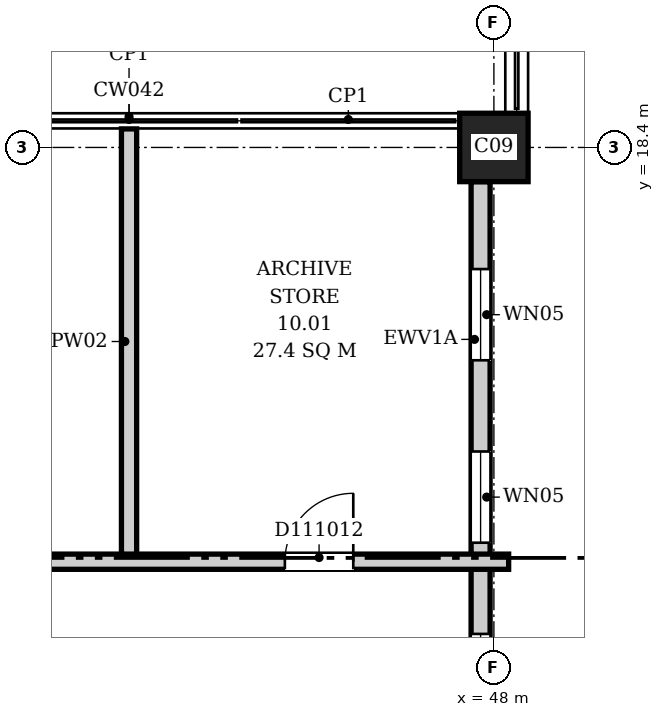
"""IFC4 building model, lengths in metres.
Left out: names, types, materials, properties, quantities, classifications, styles, units other than length and angle.
Written with IfcOpenShell. Run it as: python <this file> out.ifc"""

import sys

from ifc_helpers import new_model, si_unit, direction, frame, frame_2d, origin, origin_2d, place, context, subcontext, project, spatial, rectangle, extrude, element, fill, save


model = new_model("IFC4")
c1 = context("Model", 3, precision=1e-05, world=origin(), true_north=direction((0.0, 1.0)))
c2 = subcontext(c1, "Body", "Model", "MODEL_VIEW")
j1 = project(units=[si_unit("LENGTHUNIT", "METRE"), si_unit("PLANEANGLEUNIT", "RADIAN")], contexts=[c1])
p1 = place(None, origin())
s1 = spatial("IfcSite", under=j1, at=p1, CompositionType="ELEMENT")
p2 = place(p1, origin())
s2 = spatial("IfcBuilding", under=s1, at=p2, CompositionType="ELEMENT")
p3 = place(p2, frame((0.0, 0.0, 52.9)))
s3 = spatial("IfcBuildingStorey", under=s2, at=p3, CompositionType="ELEMENT", Elevation=52.9)
p4 = place(p3, frame((48.0, 18.4, 0.0), z_axis=(0.0, 0.0, 1.0), x_axis=(1.0, 0.0, 0.0)))
e1 = element("IfcColumn", 1, at=p4, inside=s3, PredefinedType="COLUMN", context=c2, shape_type="SweptSolid", body=[
    extrude(rectangle(XDim=0.9, YDim=0.9, at=origin_2d()), origin(), (0.0, 0.0, 1.0), 4.2),
])
p5 = place(p3, frame((47.825, 9.65, 0.0), z_axis=(0.0, 0.0, 1.0), x_axis=(0.0, 1.0, 0.0)))
e2 = element("IfcWall", 2, at=p5, inside=s3, PredefinedType="ELEMENTEDWALL", context=c2, shape_type="SweptSolid", body=[
    extrude(rectangle(XDim=8.3, YDim=0.25, at=frame_2d((4.15, 0.0))), origin(), (0.0, 0.0, 1.0), 3.3),
])
p6 = place(p5, frame((1.15, 0.0, 0.6)))
e3 = element("IfcOpeningElement", 3, at=p6, cuts=e2, PredefinedType="OPENING", context=c2, shape_type="SweptSolid", body=[
    extrude(rectangle(XDim=1.2, YDim=2.6, at=frame_2d((0.6, 1.3))), frame((0.0, 0.135, 0.0), z_axis=(0.0, -1.0, 0.0), x_axis=(1.0, 0.0, 0.0)), (0.0, 0.0, 1.0), 0.27),
])
p7 = place(p5, frame((3.55, 0.0, 0.6)))
e4 = element("IfcOpeningElement", 4, at=p7, cuts=e2, PredefinedType="OPENING", context=c2, shape_type="SweptSolid", body=[
    extrude(rectangle(XDim=1.2, YDim=2.6, at=frame_2d((0.6, 1.3))), frame((0.0, 0.135, 0.0), z_axis=(0.0, -1.0, 0.0), x_axis=(1.0, 0.0, 0.0)), (0.0, 0.0, 1.0), 0.27),
])
p8 = place(p5, frame((5.95, 0.0, 0.6)))
e5 = element("IfcOpeningElement", 5, at=p8, cuts=e2, PredefinedType="OPENING", context=c2, shape_type="SweptSolid", body=[
    extrude(rectangle(XDim=1.2, YDim=2.6, at=frame_2d((0.6, 1.3))), frame((0.0, 0.135, 0.0), z_axis=(0.0, -1.0, 0.0), x_axis=(1.0, 0.0, 0.0)), (0.0, 0.0, 1.0), 0.27),
])
p9 = place(p3, frame((27.206, 12.95, 0.0), z_axis=(0.0, 0.0, 1.0), x_axis=(1.0, 0.0, 0.0)))
e6 = element("IfcWall", 6, at=p9, inside=s3, PredefinedType="PARTITIONING", context=c2, shape_type="SweptSolid", body=[
    extrude(rectangle(XDim=20.988, YDim=0.2, at=frame_2d((10.494, 0.0))), origin(), (0.0, 0.0, 1.0), 3.9),
])
p10 = place(p9, frame((7.244, 0.0, 0.0)))
e7 = element("IfcOpeningElement", 7, at=p10, cuts=e6, PredefinedType="OPENING", context=c2, shape_type="SweptSolid", body=[
    extrude(rectangle(XDim=1.5, YDim=2.1, at=frame_2d((0.75, 1.05))), frame((0.0, 0.11, 0.0), z_axis=(0.0, -1.0, 0.0), x_axis=(1.0, 0.0, 0.0)), (0.0, 0.0, 1.0), 0.22),
])
p11 = place(p9, frame((18.044, 0.0, 0.0)))
e8 = element("IfcOpeningElement", 8, at=p11, cuts=e6, PredefinedType="OPENING", context=c2, shape_type="SweptSolid", body=[
    extrude(rectangle(XDim=0.9, YDim=2.1, at=frame_2d((0.45, 1.05))), frame((0.0, 0.11, 0.0), z_axis=(0.0, -1.0, 0.0), x_axis=(1.0, 0.0, 0.0)), (0.0, 0.0, 1.0), 0.22),
])
p12 = place(p3, frame((43.2, 13.05, 0.0), z_axis=(0.0, 0.0, 1.0), x_axis=(0.0, 1.0, 0.0)))
e9 = element("IfcWall", 9, at=p12, inside=s3, PredefinedType="PARTITIONING", context=c2, shape_type="SweptSolid", body=[
    extrude(rectangle(XDim=5.594, YDim=0.2, at=frame_2d((2.797, 0.0))), origin(), (0.0, 0.0, 1.0), 3.9),
])
p13 = place(p6, origin())
e10 = element("IfcWindow", 10, at=p13, inside=s3, PartitioningType="SINGLE_PANEL", PredefinedType="WINDOW", context=c2, shape_type="SweptSolid", body=[
    extrude(rectangle(XDim=1.2, YDim=2.6, at=frame_2d((0.6, 1.3))), frame((0.0, 0.03, 0.0), z_axis=(0.0, -1.0, 0.0), x_axis=(1.0, 0.0, 0.0)), (0.0, 0.0, 1.0), 0.06),
])
fill(e3, e10)
p14 = place(p7, origin())
e11 = element("IfcWindow", 11, at=p14, inside=s3, PartitioningType="SINGLE_PANEL", PredefinedType="WINDOW", context=c2, shape_type="SweptSolid", body=[
    extrude(rectangle(XDim=1.2, YDim=2.6, at=frame_2d((0.6, 1.3))), frame((0.0, 0.03, 0.0), z_axis=(0.0, -1.0, 0.0), x_axis=(1.0, 0.0, 0.0)), (0.0, 0.0, 1.0), 0.06),
])
fill(e4, e11)
p15 = place(p8, origin())
e12 = element("IfcWindow", 12, at=p15, inside=s3, PartitioningType="SINGLE_PANEL", PredefinedType="WINDOW", context=c2, shape_type="SweptSolid", body=[
    extrude(rectangle(XDim=1.2, YDim=2.6, at=frame_2d((0.6, 1.3))), frame((0.0, 0.03, 0.0), z_axis=(0.0, -1.0, 0.0), x_axis=(1.0, 0.0, 0.0)), (0.0, 0.0, 1.0), 0.06),
])
fill(e5, e12)
p16 = place(p11, origin())
e13 = element("IfcDoor", 13, at=p16, inside=s3, OperationType="SINGLE_SWING_RIGHT", PredefinedType="DOOR", context=c2, shape_type="SweptSolid", body=[
    extrude(rectangle(XDim=0.9, YDim=2.1, at=frame_2d((0.45, 1.05))), frame((0.0, 0.025, 0.0), z_axis=(0.0, -1.0, 0.0), x_axis=(1.0, 0.0, 0.0)), (0.0, 0.0, 1.0), 0.05),
])
fill(e8, e13)
save(model, sys.argv[1])
